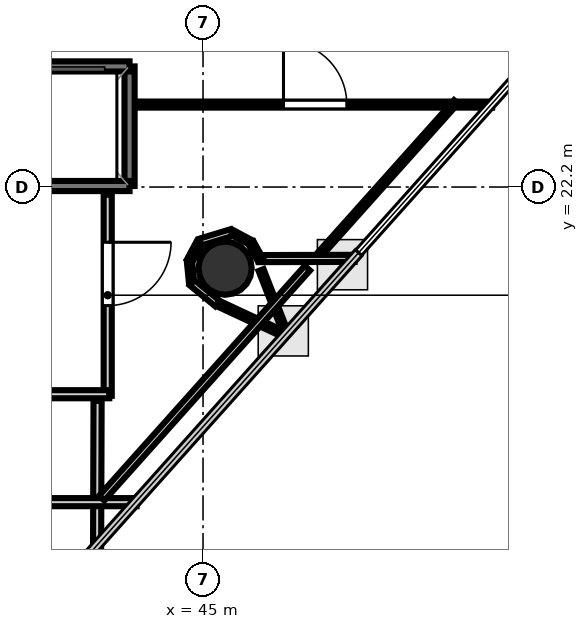
"""IFC4 building model, lengths in metres.
Left out: names, types, materials, properties, quantities, classifications, styles, units other than length and angle.
Written with IfcOpenShell. Run it as: python <this file> out.ifc"""

import sys

from ifc_helpers import new_model, si_unit, direction, frame, frame_2d, origin, origin_2d, place, context, subcontext, project, spatial, rectangle, hollow_circle, extrude, element, fill, save


model = new_model("IFC4")
c1 = context("Model", 3, precision=1e-05, world=origin(), true_north=direction((0.0, 1.0)))
c2 = subcontext(c1, "Body", "Model", "MODEL_VIEW")
j1 = project(units=[si_unit("LENGTHUNIT", "METRE"), si_unit("PLANEANGLEUNIT", "RADIAN")], contexts=[c1])
p1 = place(None, origin())
s1 = spatial("IfcSite", under=j1, at=p1, CompositionType="ELEMENT")
p2 = place(p1, origin())
s2 = spatial("IfcBuilding", under=s1, at=p2, CompositionType="ELEMENT")
p3 = place(p2, frame((0.0, 0.0, 250.1)))
s3 = spatial("IfcBuildingStorey", under=s2, at=p3, CompositionType="ELEMENT", Elevation=250.1)
p4 = place(p3, frame((45.436, 20.598, 0.0), z_axis=(0.0, 0.0, 1.0), x_axis=(1.0, 0.0, 0.0)))
e1 = element("IfcColumn", 1, at=p4, inside=s3, PredefinedType="COLUMN", context=c2, shape_type="SweptSolid", body=[
    extrude(hollow_circle(Radius=0.525, WallThickness=0.028, at=origin_2d()), origin(), (0.0, 0.0, 1.0), 3.7),
])
p5 = place(p3, frame((43.55, 22.22, 0.0), z_axis=(0.0, 0.0, 1.0), x_axis=(0.0, 1.0, 0.0)))
e2 = element("IfcWall", 2, at=p5, inside=s3, PredefinedType="SOLIDWALL", context=c2, shape_type="SweptSolid", body=[
    extrude(rectangle(XDim=2.36, YDim=0.2, at=frame_2d((1.18, 0.0))), origin(), (0.0, 0.0, 1.0), 3.52),
])
for number, where, z_axis, x_axis in (
    (3, (41.45, 24.58, 0.0), (0.0, 0.0, 1.0), (1.0, 0.0, 0.0)),
    (4, (41.45, 22.22, 0.0), (0.0, 0.0, 1.0), (1.0, 0.0, 0.0)),
):
    element("IfcWall", number, at=place(p3, frame(where, z_axis=z_axis, x_axis=x_axis)), inside=s3, PredefinedType="SOLIDWALL", context=c2, shape_type="SweptSolid", body=[
        extrude(rectangle(XDim=2.1, YDim=0.2, at=frame_2d((1.05, 0.0))), origin(), (0.0, 0.0, 1.0), 3.52),
    ])
p6 = place(p3, frame((43.119, 22.05, 0.0), z_axis=(0.0, 0.0, 1.0), x_axis=(0.0, -1.0, 0.0)))
e5 = element("IfcWall", 5, at=p6, inside=s3, PredefinedType="PARTITIONING", context=c2, shape_type="SweptSolid", body=[
    extrude(rectangle(XDim=3.97, YDim=0.16, at=frame_2d((1.985, 0.0))), origin(), (0.0, 0.0, 1.0), 2.84),
])
p7 = place(p6, frame((0.94, 0.0, 0.0)))
e6 = element("IfcOpeningElement", 6, at=p7, cuts=e5, PredefinedType="OPENING", context=c2, shape_type="SweptSolid", body=[
    extrude(rectangle(XDim=1.25, YDim=2.2, at=frame_2d((0.625, 1.1))), frame((0.0, 0.09, 0.0), z_axis=(0.0, -1.0, 0.0), x_axis=(1.0, 0.0, 0.0)), (0.0, 0.0, 1.0), 0.18),
])
p8 = place(p3, frame((43.15, 18.111, 0.0), z_axis=(0.0, 0.0, 1.0), x_axis=(-1.0, 0.0, 0.0)))
e7 = element("IfcWall", 7, at=p8, inside=s3, PredefinedType="PARTITIONING", context=c2, shape_type="SweptSolid", body=[
    extrude(rectangle(XDim=2.73, YDim=0.16, at=frame_2d((1.365, 0.0))), origin(), (0.0, 0.0, 1.0), 2.84),
])
p9 = place(p8, frame((1.4, 0.0, 0.0)))
e8 = element("IfcOpeningElement", 8, at=p9, cuts=e7, PredefinedType="OPENING", context=c2, shape_type="SweptSolid", body=[
    extrude(rectangle(XDim=1.05, YDim=2.15, at=frame_2d((0.525, 1.075))), frame((0.0, 0.09, 0.0), z_axis=(0.0, -1.0, 0.0), x_axis=(1.0, 0.0, 0.0)), (0.0, 0.0, 1.0), 0.18),
])
p10 = place(p3, frame((42.919, 17.98, 0.0), z_axis=(0.0, 0.0, 1.0), x_axis=(-0.003320260942, -0.999994487918, 0.0)))
e9 = element("IfcWall", 9, at=p10, inside=s3, PredefinedType="PARTITIONING", context=c2, shape_type="SweptSolid", body=[
    extrude(rectangle(XDim=2.868, YDim=0.16, at=frame_2d((1.434, 0.0))), origin(), (0.0, 0.0, 1.0), 2.84),
])
p11 = place(p3, frame((43.689, 15.981, 0.0), z_axis=(0.0, 0.0, 1.0), x_axis=(-1.0, 0.0, 0.0)))
e10 = element("IfcWall", 10, at=p11, inside=s3, PredefinedType="PARTITIONING", context=c2, shape_type="SweptSolid", body=[
    extrude(rectangle(XDim=15.089, YDim=0.16, at=frame_2d((7.544, 0.0))), origin(), (0.0, 0.0, 1.0), 2.84),
])
p12 = place(p11, frame((6.957, 0.0, 0.0)))
e11 = element("IfcOpeningElement", 11, at=p12, cuts=e10, PredefinedType="OPENING", context=c2, shape_type="SweptSolid", body=[
    extrude(rectangle(XDim=1.25, YDim=2.2, at=frame_2d((0.625, 1.1))), frame((0.0, 0.09, 0.0), z_axis=(0.0, -1.0, 0.0), x_axis=(1.0, 0.0, 0.0)), (0.0, 0.0, 1.0), 0.18),
])
p13 = place(p3, frame((43.72, 23.827, 0.0), z_axis=(0.0, 0.0, 1.0), x_axis=(1.0, 0.0, 0.0)))
e12 = element("IfcWall", 12, at=p13, inside=s3, PredefinedType="PARTITIONING", context=c2, shape_type="SweptSolid", body=[
    extrude(rectangle(XDim=6.985, YDim=0.12, at=frame_2d((3.493, 0.0))), origin(), (0.0, 0.0, 1.0), 2.84),
])
p14 = place(p13, frame((2.868, 0.0, 0.0)))
e13 = element("IfcOpeningElement", 13, at=p14, cuts=e12, PredefinedType="OPENING", context=c2, shape_type="SweptSolid", body=[
    extrude(rectangle(XDim=1.25, YDim=2.2, at=frame_2d((0.625, 1.1))), frame((0.0, 0.07, 0.0), z_axis=(0.0, -1.0, 0.0), x_axis=(1.0, 0.0, 0.0)), (0.0, 0.0, 1.0), 0.14),
])
p15 = place(p3, frame((49.992, 23.879, 0.0), z_axis=(0.0, 0.0, 1.0), x_axis=(-0.666631757863, -0.745387214412, 0.0)))
e14 = element("IfcWall", 14, at=p15, inside=s3, PredefinedType="PARTITIONING", context=c2, shape_type="SweptSolid", body=[
    extrude(rectangle(XDim=4.157, YDim=0.105, at=frame_2d((2.079, 0.0))), origin(), (0.0, 0.0, 1.0), 2.84),
])
p16 = place(p3, frame((47.991, 20.792, 0.0), z_axis=(0.0, 0.0, 1.0), x_axis=(-0.999997300034, -0.002323773741, 0.0)))
e15 = element("IfcWall", 15, at=p16, inside=s3, PredefinedType="PARTITIONING", context=c2, shape_type="SweptSolid", body=[
    extrude(rectangle(XDim=1.891, YDim=0.14, at=frame_2d((0.946, 0.0))), origin(), (0.0, 0.0, 1.0), 2.84),
])
p17 = place(p3, frame((46.127, 20.771, 0.0), z_axis=(0.0, 0.0, 1.0), x_axis=(-0.483302691899, 0.875453315719, 0.0)))
e16 = element("IfcWall", 16, at=p17, inside=s3, PredefinedType="PARTITIONING", context=c2, shape_type="SweptSolid", body=[
    extrude(rectangle(XDim=0.372, YDim=0.12, at=frame_2d((0.186, 0.0))), origin(), (0.0, 0.0, 1.0), 2.84),
])
p18 = place(p3, frame((45.935, 21.11, 0.0), z_axis=(0.0, 0.0, 1.0), x_axis=(-0.881944865518, 0.471352579484, 0.0)))
e17 = element("IfcWall", 17, at=p18, inside=s3, PredefinedType="PARTITIONING", context=c2, shape_type="SweptSolid", body=[
    extrude(rectangle(XDim=0.398, YDim=0.105, at=frame_2d((0.199, 0.0))), origin(), (0.0, 0.0, 1.0), 2.84),
])
p19 = place(p3, frame((45.561, 21.3, 0.0), z_axis=(0.0, 0.0, 1.0), x_axis=(-0.956916224704, -0.290364148784, 0.0)))
e18 = element("IfcWall", 18, at=p19, inside=s3, PredefinedType="PARTITIONING", context=c2, shape_type="SweptSolid", body=[
    extrude(rectangle(XDim=0.646, YDim=0.14, at=frame_2d((0.323, 0.0))), origin(), (0.0, 0.0, 1.0), 2.84),
])
p20 = place(p3, frame((44.924, 21.097, 0.0), z_axis=(0.0, 0.0, 1.0), x_axis=(-0.471607834051, -0.881808398044, 0.0)))
e19 = element("IfcWall", 19, at=p20, inside=s3, PredefinedType="PARTITIONING", context=c2, shape_type="SweptSolid", body=[
    extrude(rectangle(XDim=0.397, YDim=0.12, at=frame_2d((0.199, 0.0))), origin(), (0.0, 0.0, 1.0), 2.84),
])
p21 = place(p3, frame((44.733, 20.729, 0.0), z_axis=(0.0, 0.0, 1.0), x_axis=(0.097619118958, -0.995223847993, 0.0)))
e20 = element("IfcWall", 20, at=p21, inside=s3, PredefinedType="PARTITIONING", context=c2, shape_type="SweptSolid", body=[
    extrude(rectangle(XDim=0.398, YDim=0.105, at=frame_2d((0.199, 0.0))), origin(), (0.0, 0.0, 1.0), 2.84),
])
p22 = place(p3, frame((44.783, 20.312, 0.0), z_axis=(0.0, 0.0, 1.0), x_axis=(0.772878500367, -0.634554035265, 0.0)))
e21 = element("IfcWall", 21, at=p22, inside=s3, PredefinedType="PARTITIONING", context=c2, shape_type="SweptSolid", body=[
    extrude(rectangle(XDim=0.646, YDim=0.14, at=frame_2d((0.323, 0.0))), origin(), (0.0, 0.0, 1.0), 2.84),
])
p23 = place(p3, frame((45.308, 19.896, 0.0), z_axis=(0.0, 0.0, 1.0), x_axis=(0.906290700872, -0.422654901206, 0.0)))
e22 = element("IfcWall", 22, at=p23, inside=s3, PredefinedType="PARTITIONING", context=c2, shape_type="SweptSolid", body=[
    extrude(rectangle(XDim=1.449, YDim=0.12, at=frame_2d((0.725, 0.0))), origin(), (0.0, 0.0, 1.0), 2.84),
])
p24 = place(p3, frame((46.639, 19.302, 0.0), z_axis=(0.0, 0.0, 1.0), x_axis=(-0.364501452611, 0.9312028195, 0.0)))
e23 = element("IfcWall", 23, at=p24, inside=s3, PredefinedType="PARTITIONING", context=c2, shape_type="SweptSolid", body=[
    extrude(rectangle(XDim=1.352, YDim=0.105, at=frame_2d((0.676, 0.0))), origin(), (0.0, 0.0, 1.0), 2.84),
])
p25 = place(p3, frame((47.06, 20.6, 0.0), z_axis=(0.0, 0.0, 1.0), x_axis=(-0.666617878576, -0.745399627021, 0.0)))
e24 = element("IfcWall", 24, at=p25, inside=s3, PredefinedType="PARTITIONING", context=c2, shape_type="SweptSolid", body=[
    extrude(rectangle(XDim=6.089, YDim=0.14, at=frame_2d((3.045, 0.0))), origin(), (0.0, 0.0, 1.0), 2.84),
])
p26 = place(p7, origin())
e25 = element("IfcDoor", 25, at=p26, inside=s3, OperationType="SINGLE_SWING_LEFT", PredefinedType="DOOR", context=c2, shape_type="SweptSolid", body=[
    extrude(rectangle(XDim=1.25, YDim=2.2, at=frame_2d((0.625, 1.1))), frame((0.0, 0.025, 0.0), z_axis=(0.0, -1.0, 0.0), x_axis=(1.0, 0.0, 0.0)), (0.0, 0.0, 1.0), 0.05),
])
fill(e6, e25)
p27 = place(p14, origin())
e26 = element("IfcDoor", 26, at=p27, inside=s3, OperationType="SINGLE_SWING_LEFT", PredefinedType="DOOR", context=c2, shape_type="SweptSolid", body=[
    extrude(rectangle(XDim=1.25, YDim=2.2, at=frame_2d((0.625, 1.1))), frame((0.0, 0.025, 0.0), z_axis=(0.0, -1.0, 0.0), x_axis=(1.0, 0.0, 0.0)), (0.0, 0.0, 1.0), 0.05),
])
fill(e13, e26)
save(model, sys.argv[1])
